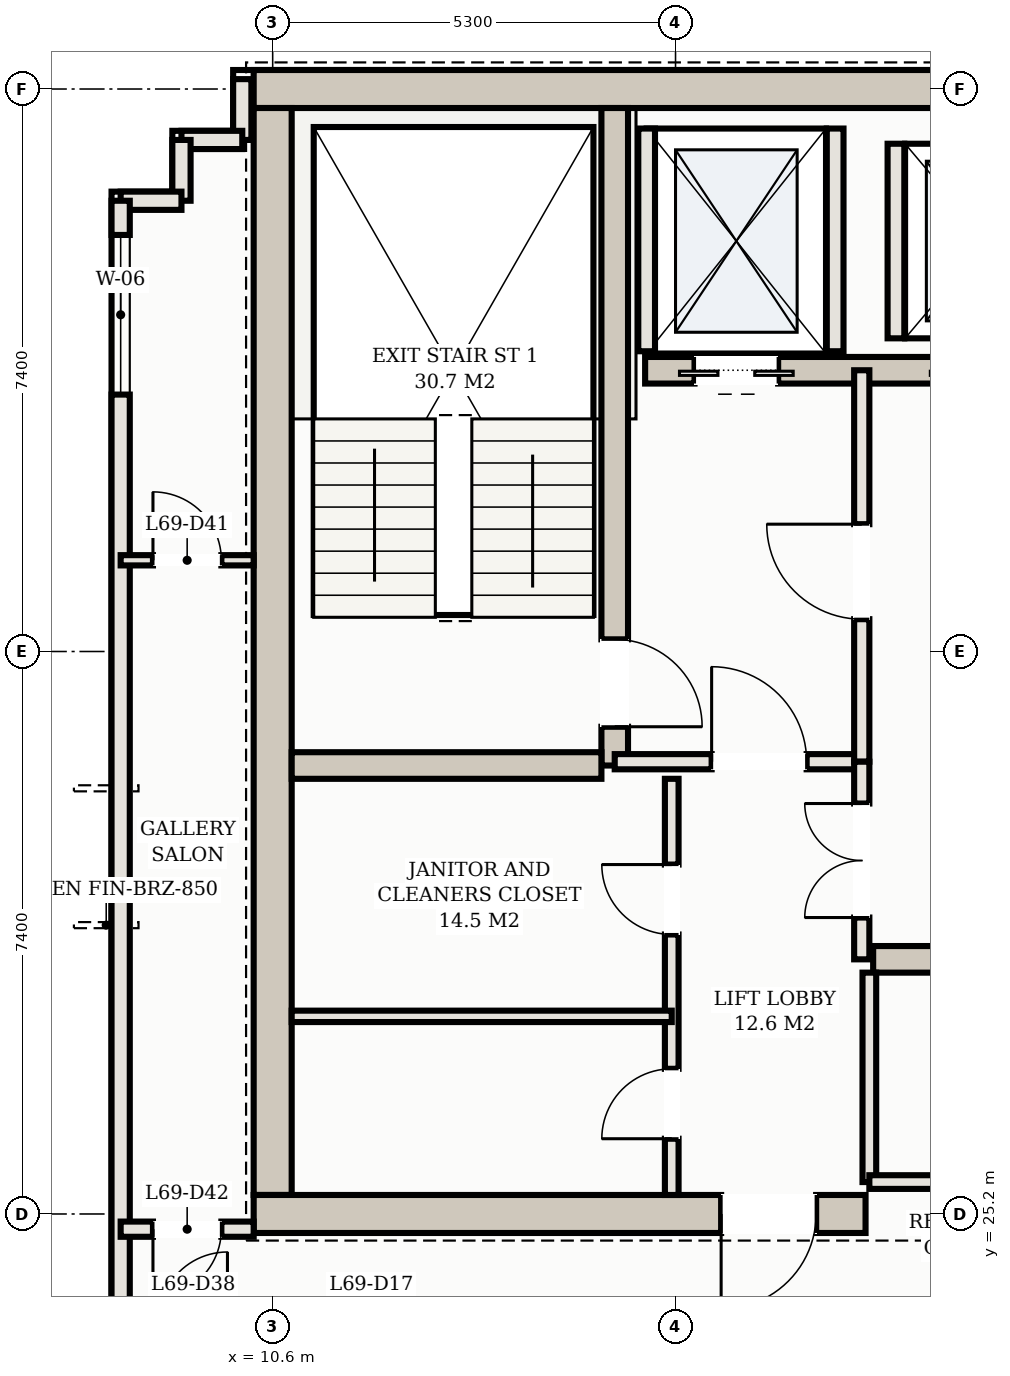
"""IFC4 building model, lengths in metres.
Left out: names, types, materials, properties, quantities, classifications, styles, units other than length and angle.
Written with IfcOpenShell. Run it as: python <this file> out.ifc"""

import sys

from ifc_helpers import new_model, si_unit, direction, frame, frame_2d, origin, place, context, subcontext, project, spatial, rectangle, extrude, element, fill, save


model = new_model("IFC4")
c1 = context("Model", 3, precision=1e-05, world=origin(), true_north=direction((0.0, 1.0)))
c2 = subcontext(c1, "Body", "Model", "MODEL_VIEW")
j1 = project(units=[si_unit("LENGTHUNIT", "METRE"), si_unit("PLANEANGLEUNIT", "RADIAN")], contexts=[c1])
p1 = place(None, origin())
s1 = spatial("IfcSite", under=j1, at=p1, CompositionType="ELEMENT")
p2 = place(p1, origin())
s2 = spatial("IfcBuilding", under=s1, at=p2, CompositionType="ELEMENT")
p3 = place(p2, frame((0.0, 0.0, 249.5)))
s3 = spatial("IfcBuildingStorey", under=s2, at=p3, CompositionType="ELEMENT", Elevation=249.5)
p4 = place(p3, frame((10.35, 40.0, 0.0), z_axis=(0.0, 0.0, 1.0), x_axis=(1.0, 0.0, 0.0)))
e1 = element("IfcWall", 1, at=p4, inside=s3, PredefinedType="SHEAR", context=c2, shape_type="SweptSolid", body=[
    extrude(rectangle(XDim=32.3, YDim=0.5, at=frame_2d((16.15, 0.0))), origin(), (0.0, 0.0, 1.0), 3.11),
])
p5 = place(p3, frame((10.6, 25.45, 0.0), z_axis=(0.0, 0.0, 1.0), x_axis=(0.0, 1.0, 0.0)))
e2 = element("IfcWall", 2, at=p5, inside=s3, PredefinedType="SHEAR", context=c2, shape_type="SweptSolid", body=[
    extrude(rectangle(XDim=14.3, YDim=0.5, at=frame_2d((7.15, 0.0))), origin(), (0.0, 0.0, 1.0), 3.11),
])
p6 = place(p3, frame((10.35, 25.2, 0.0), z_axis=(0.0, 0.0, 1.0), x_axis=(1.0, 0.0, 0.0)))
e3 = element("IfcWall", 3, at=p6, inside=s3, PredefinedType="SHEAR", context=c2, shape_type="SweptSolid", body=[
    extrude(rectangle(XDim=8.05, YDim=0.5, at=frame_2d((4.025, 0.0))), origin(), (0.0, 0.0, 1.0), 3.11),
])
p7 = place(p6, frame((6.15, 0.0, 0.0)))
e4 = element("IfcOpeningElement", 4, at=p7, cuts=e3, PredefinedType="OPENING", context=c2, shape_type="SweptSolid", body=[
    extrude(rectangle(XDim=1.25, YDim=2.2, at=frame_2d((0.625, 1.1))), frame((0.0, 0.26, 0.0), z_axis=(0.0, -1.0, 0.0), x_axis=(1.0, 0.0, 0.0)), (0.0, 0.0, 1.0), 0.52),
])
p8 = place(p3, frame((15.1, 31.1, 0.0), z_axis=(0.0, 0.0, 1.0), x_axis=(0.0, 1.0, 0.0)))
e5 = element("IfcWall", 5, at=p8, inside=s3, PredefinedType="SHEAR", context=c2, shape_type="SweptSolid", body=[
    extrude(rectangle(XDim=8.65, YDim=0.35, at=frame_2d((4.325, 0.0))), origin(), (0.0, 0.0, 1.0), 3.11),
])
p9 = place(p8, frame((0.51, 0.0, 0.0)))
e6 = element("IfcOpeningElement", 6, at=p9, cuts=e5, PredefinedType="OPENING", context=c2, shape_type="SweptSolid", body=[
    extrude(rectangle(XDim=1.15, YDim=2.2, at=frame_2d((0.575, 1.1))), frame((0.0, 0.185, 0.0), z_axis=(0.0, -1.0, 0.0), x_axis=(1.0, 0.0, 0.0)), (0.0, 0.0, 1.0), 0.37),
])
p10 = place(p3, frame((10.85, 31.1, 0.0), z_axis=(0.0, 0.0, 1.0), x_axis=(1.0, 0.0, 0.0)))
e7 = element("IfcWall", 7, at=p10, inside=s3, PredefinedType="SHEAR", context=c2, shape_type="SweptSolid", body=[
    extrude(rectangle(XDim=4.075, YDim=0.35, at=frame_2d((2.038, 0.0))), origin(), (0.0, 0.0, 1.0), 3.11),
])
p11 = place(p3, frame((15.5, 36.3, 0.0), z_axis=(0.0, 0.0, 1.0), x_axis=(1.0, 0.0, 0.0)))
e8 = element("IfcWall", 8, at=p11, inside=s3, PredefinedType="SHEAR", context=c2, shape_type="SweptSolid", body=[
    extrude(rectangle(XDim=22.0, YDim=0.35, at=frame_2d((11.0, 0.0))), origin(), (0.0, 0.0, 1.0), 3.11),
])
p12 = place(p11, frame((0.65, 0.0, 0.0)))
e9 = element("IfcOpeningElement", 9, at=p12, cuts=e8, PredefinedType="OPENING", context=c2, shape_type="SweptSolid", body=[
    extrude(rectangle(XDim=1.1, YDim=2.15, at=frame_2d((0.55, 1.075))), frame((0.0, 0.185, 0.0), z_axis=(0.0, -1.0, 0.0), x_axis=(1.0, 0.0, 0.0)), (0.0, 0.0, 1.0), 0.37),
])
p13 = place(p11, frame((20.25, 0.0, 0.0)))
e10 = element("IfcOpeningElement", 10, at=p13, cuts=e8, PredefinedType="OPENING", context=c2, shape_type="SweptSolid", body=[
    extrude(rectangle(XDim=1.1, YDim=2.15, at=frame_2d((0.55, 1.075))), frame((0.0, 0.185, 0.0), z_axis=(0.0, -1.0, 0.0), x_axis=(1.0, 0.0, 0.0)), (0.0, 0.0, 1.0), 0.37),
])
p14 = place(p11, frame((17.05, 0.0, 0.0)))
e11 = element("IfcOpeningElement", 11, at=p14, cuts=e8, PredefinedType="OPENING", context=c2, shape_type="SweptSolid", body=[
    extrude(rectangle(XDim=1.3, YDim=2.2, at=frame_2d((0.65, 1.1))), frame((0.0, 0.185, 0.0), z_axis=(0.0, -1.0, 0.0), x_axis=(1.0, 0.0, 0.0)), (0.0, 0.0, 1.0), 0.37),
])
p15 = place(p11, frame((3.95, 0.0, 0.0)))
e12 = element("IfcOpeningElement", 12, at=p15, cuts=e8, PredefinedType="OPENING", context=c2, shape_type="SweptSolid", body=[
    extrude(rectangle(XDim=1.1, YDim=2.15, at=frame_2d((0.55, 1.075))), frame((0.0, 0.185, 0.0), z_axis=(0.0, -1.0, 0.0), x_axis=(1.0, 0.0, 0.0)), (0.0, 0.0, 1.0), 0.37),
])
p16 = place(p11, frame((6.55, 0.0, 0.0)))
e13 = element("IfcOpeningElement", 13, at=p16, cuts=e8, PredefinedType="OPENING", context=c2, shape_type="SweptSolid", body=[
    extrude(rectangle(XDim=1.1, YDim=2.15, at=frame_2d((0.55, 1.075))), frame((0.0, 0.185, 0.0), z_axis=(0.0, -1.0, 0.0), x_axis=(1.0, 0.0, 0.0)), (0.0, 0.0, 1.0), 0.37),
])
p17 = place(p11, frame((9.15, 0.0, 0.0)))
e14 = element("IfcOpeningElement", 14, at=p17, cuts=e8, PredefinedType="OPENING", context=c2, shape_type="SweptSolid", body=[
    extrude(rectangle(XDim=1.1, YDim=2.15, at=frame_2d((0.55, 1.075))), frame((0.0, 0.185, 0.0), z_axis=(0.0, -1.0, 0.0), x_axis=(1.0, 0.0, 0.0)), (0.0, 0.0, 1.0), 0.37),
])
p18 = place(p3, frame((18.5, 28.55, 0.0), z_axis=(0.0, 0.0, 1.0), x_axis=(1.0, 0.0, 0.0)))
e15 = element("IfcWall", 15, at=p18, inside=s3, PredefinedType="SHEAR", context=c2, shape_type="SweptSolid", body=[
    extrude(rectangle(XDim=16.0, YDim=0.35, at=frame_2d((8.0, 0.0))), origin(), (0.0, 0.0, 1.0), 3.11),
])
for number, where, z_axis, x_axis in (
    (16, (15.52, 36.55, 0.0), (0.0, 0.0, 1.0), (0.0, 1.0, 0.0)),
    (17, (18.0, 36.55, 0.0), (0.0, 0.0, 1.0), (0.0, 1.0, 0.0)),
):
    element("IfcWall", number, at=place(p3, frame(where, z_axis=z_axis, x_axis=x_axis)), inside=s3, PredefinedType="SOLIDWALL", context=c2, shape_type="SweptSolid", body=[
        extrude(rectangle(XDim=2.93, YDim=0.22, at=frame_2d((1.465, 0.0))), origin(), (0.0, 0.0, 1.0), 3.11),
    ])
p19 = place(p3, frame((18.8, 36.72, 0.0), z_axis=(0.0, 0.0, 1.0), x_axis=(0.0, 1.0, 0.0)))
e18 = element("IfcWall", 18, at=p19, inside=s3, PredefinedType="SOLIDWALL", context=c2, shape_type="SweptSolid", body=[
    extrude(rectangle(XDim=2.56, YDim=0.22, at=frame_2d((1.28, 0.0))), origin(), (0.0, 0.0, 1.0), 3.11),
])
p20 = place(p3, frame((10.2, 40.13, 0.0), z_axis=(0.0, 0.0, 1.0), x_axis=(0.0, -1.0, 0.0)))
e19 = element("IfcWall", 19, at=p20, inside=s3, PredefinedType="SOLIDWALL", context=c2, shape_type="SweptSolid", body=[
    extrude(rectangle(XDim=0.8, YDim=0.24, at=frame_2d((0.4, 0.0))), origin(), (0.0, 0.0, 1.0), 3.11),
])
for number, where, z_axis, x_axis in (
    (20, (10.2, 39.33, 0.0), (0.0, 0.0, 1.0), (-1.0, 0.0, 0.0)),
    (21, (9.4, 39.33, 0.0), (0.0, 0.0, 1.0), (0.0, -1.0, 0.0)),
):
    element("IfcWall", number, at=place(p3, frame(where, z_axis=z_axis, x_axis=x_axis)), inside=s3, PredefinedType="SOLIDWALL", context=c2, shape_type="SweptSolid", body=[
        extrude(rectangle(XDim=0.8, YDim=0.24, at=frame_2d((0.4, 0.0))), origin(), (0.0, 0.0, 1.0), 3.11),
    ])
p21 = place(p3, frame((9.4, 38.53, 0.0), z_axis=(0.0, 0.0, 1.0), x_axis=(-1.0, 0.0, 0.0)))
e22 = element("IfcWall", 22, at=p21, inside=s3, PredefinedType="SOLIDWALL", context=c2, shape_type="SweptSolid", body=[
    extrude(rectangle(XDim=0.8, YDim=0.24, at=frame_2d((0.4, 0.0))), origin(), (0.0, 0.0, 1.0), 3.11),
])
p22 = place(p3, frame((8.6, 38.53, 0.0), z_axis=(0.0, 0.0, 1.0), x_axis=(0.0, -1.0, 0.0)))
e23 = element("IfcWall", 23, at=p22, inside=s3, PredefinedType="SOLIDWALL", context=c2, shape_type="SweptSolid", body=[
    extrude(rectangle(XDim=26.01, YDim=0.24, at=frame_2d((13.005, 0.0))), origin(), (0.0, 0.0, 1.0), 3.11),
])
p23 = place(p22, frame((19.73, 0.0, 0.0)))
e24 = element("IfcOpeningElement", 24, at=p23, cuts=e23, PredefinedType="OPENING", context=c2, shape_type="SweptSolid", body=[
    extrude(rectangle(XDim=1.8, YDim=2.2, at=frame_2d((0.9, 1.1))), frame((0.0, 0.13, 0.0), z_axis=(0.0, -1.0, 0.0), x_axis=(1.0, 0.0, 0.0)), (0.0, 0.0, 1.0), 0.26),
])
p24 = place(p22, frame((0.45, 0.0, 0.75)))
e25 = element("IfcOpeningElement", 25, at=p24, cuts=e23, PredefinedType="OPENING", context=c2, shape_type="SweptSolid", body=[
    extrude(rectangle(XDim=2.1, YDim=1.65, at=frame_2d((1.05, 0.825))), frame((0.0, 0.13, 0.0), z_axis=(0.0, -1.0, 0.0), x_axis=(1.0, 0.0, 0.0)), (0.0, 0.0, 1.0), 0.26),
])
p25 = place(p3, frame((15.1, 31.15, 0.0), z_axis=(0.0, 0.0, 1.0), x_axis=(1.0, 0.0, 0.0)))
e26 = element("IfcWall", 26, at=p25, inside=s3, PredefinedType="PARTITIONING", context=c2, shape_type="SweptSolid", body=[
    extrude(rectangle(XDim=3.25, YDim=0.2, at=frame_2d((1.625, 0.0))), origin(), (0.0, 0.0, 1.0), 2.45),
])
p26 = place(p25, frame((1.275, 0.0, 0.0)))
e27 = element("IfcOpeningElement", 27, at=p26, cuts=e26, PredefinedType="OPENING", context=c2, shape_type="SweptSolid", body=[
    extrude(rectangle(XDim=1.25, YDim=2.2, at=frame_2d((0.625, 1.1))), frame((0.0, 0.11, 0.0), z_axis=(0.0, -1.0, 0.0), x_axis=(1.0, 0.0, 0.0)), (0.0, 0.0, 1.0), 0.22),
])
p27 = place(p3, frame((18.35, 31.15, 0.0), z_axis=(0.0, 0.0, 1.0), x_axis=(0.0, 1.0, 0.0)))
e28 = element("IfcWall", 28, at=p27, inside=s3, PredefinedType="PARTITIONING", context=c2, shape_type="SweptSolid", body=[
    extrude(rectangle(XDim=5.15, YDim=0.2, at=frame_2d((2.575, 0.0))), origin(), (0.0, 0.0, 1.0), 2.45),
])
p28 = place(p27, frame((1.875, 0.0, 0.0)))
e29 = element("IfcOpeningElement", 29, at=p28, cuts=e28, PredefinedType="OPENING", context=c2, shape_type="SweptSolid", body=[
    extrude(rectangle(XDim=1.25, YDim=2.2, at=frame_2d((0.625, 1.1))), frame((0.0, 0.11, 0.0), z_axis=(0.0, -1.0, 0.0), x_axis=(1.0, 0.0, 0.0)), (0.0, 0.0, 1.0), 0.22),
])
p29 = place(p3, frame((15.85, 25.45, 0.0), z_axis=(0.0, 0.0, 1.0), x_axis=(0.0, 1.0, 0.0)))
e30 = element("IfcWall", 30, at=p29, inside=s3, PredefinedType="PARTITIONING", context=c2, shape_type="SweptSolid", body=[
    extrude(rectangle(XDim=5.475, YDim=0.18, at=frame_2d((2.738, 0.0))), origin(), (0.0, 0.0, 1.0), 2.45),
])
p30 = place(p29, frame((0.74, 0.0, 0.0)))
e31 = element("IfcOpeningElement", 31, at=p30, cuts=e30, PredefinedType="OPENING", context=c2, shape_type="SweptSolid", body=[
    extrude(rectangle(XDim=0.92, YDim=2.15, at=frame_2d((0.46, 1.075))), frame((0.0, 0.1, 0.0), z_axis=(0.0, -1.0, 0.0), x_axis=(1.0, 0.0, 0.0)), (0.0, 0.0, 1.0), 0.2),
])
p31 = place(p29, frame((3.427, 0.0, 0.0)))
e32 = element("IfcOpeningElement", 32, at=p31, cuts=e30, PredefinedType="OPENING", context=c2, shape_type="SweptSolid", body=[
    extrude(rectangle(XDim=0.92, YDim=2.15, at=frame_2d((0.46, 1.075))), frame((0.0, 0.1, 0.0), z_axis=(0.0, -1.0, 0.0), x_axis=(1.0, 0.0, 0.0)), (0.0, 0.0, 1.0), 0.2),
])
p32 = place(p3, frame((10.85, 27.8, 0.0), z_axis=(0.0, 0.0, 1.0), x_axis=(1.0, 0.0, 0.0)))
e33 = element("IfcWall", 33, at=p32, inside=s3, PredefinedType="PARTITIONING", context=c2, shape_type="SweptSolid", body=[
    extrude(rectangle(XDim=5.0, YDim=0.15, at=frame_2d((2.5, 0.0))), origin(), (0.0, 0.0, 1.0), 2.45),
])
p33 = place(p3, frame((18.35, 28.55, 0.0), z_axis=(0.0, 0.0, 1.0), x_axis=(0.0, 1.0, 0.0)))
e34 = element("IfcWall", 34, at=p33, inside=s3, PredefinedType="PARTITIONING", context=c2, shape_type="SweptSolid", body=[
    extrude(rectangle(XDim=2.6, YDim=0.2, at=frame_2d((1.3, 0.0))), origin(), (0.0, 0.0, 1.0), 2.45),
])
p34 = place(p33, frame((0.55, 0.0, 0.0)))
e35 = element("IfcOpeningElement", 35, at=p34, cuts=e34, PredefinedType="OPENING", context=c2, shape_type="SweptSolid", body=[
    extrude(rectangle(XDim=1.5, YDim=2.25, at=frame_2d((0.75, 1.125))), frame((0.0, 0.11, 0.0), z_axis=(0.0, -1.0, 0.0), x_axis=(1.0, 0.0, 0.0)), (0.0, 0.0, 1.0), 0.22),
])
p35 = place(p3, frame((18.45, 25.62, 0.0), z_axis=(0.0, 0.0, 1.0), x_axis=(0.0, 1.0, 0.0)))
e36 = element("IfcWall", 36, at=p35, inside=s3, PredefinedType="PARTITIONING", context=c2, shape_type="SweptSolid", body=[
    extrude(rectangle(XDim=2.755, YDim=0.18, at=frame_2d((1.377, 0.0))), origin(), (0.0, 0.0, 1.0), 2.45),
])
p36 = place(p3, frame((18.45, 25.62, 0.0), z_axis=(0.0, 0.0, 1.0), x_axis=(1.0, 0.0, 0.0)))
e37 = element("IfcWall", 37, at=p36, inside=s3, PredefinedType="PARTITIONING", context=c2, shape_type="SweptSolid", body=[
    extrude(rectangle(XDim=7.9, YDim=0.18, at=frame_2d((3.95, 0.0))), origin(), (0.0, 0.0, 1.0), 2.45),
])
p37 = place(p36, frame((3.34, 0.0, 0.0)))
e38 = element("IfcOpeningElement", 38, at=p37, cuts=e37, PredefinedType="OPENING", context=c2, shape_type="SweptSolid", body=[
    extrude(rectangle(XDim=0.92, YDim=2.15, at=frame_2d((0.46, 1.075))), frame((0.0, 0.1, 0.0), z_axis=(0.0, -1.0, 0.0), x_axis=(1.0, 0.0, 0.0)), (0.0, 0.0, 1.0), 0.2),
])
p38 = place(p3, frame((8.6, 25.0, 0.0), z_axis=(0.0, 0.0, 1.0), x_axis=(1.0, 0.0, 0.0)))
e39 = element("IfcWall", 39, at=p38, inside=s3, PredefinedType="PARTITIONING", context=c2, shape_type="SweptSolid", body=[
    extrude(rectangle(XDim=1.75, YDim=0.2, at=frame_2d((0.875, 0.0))), origin(), (0.0, 0.0, 1.0), 2.45),
])
p39 = place(p38, frame((0.425, 0.0, 0.0)))
e40 = element("IfcOpeningElement", 40, at=p39, cuts=e39, PredefinedType="OPENING", context=c2, shape_type="SweptSolid", body=[
    extrude(rectangle(XDim=0.9, YDim=2.15, at=frame_2d((0.45, 1.075))), frame((0.0, 0.11, 0.0), z_axis=(0.0, -1.0, 0.0), x_axis=(1.0, 0.0, 0.0)), (0.0, 0.0, 1.0), 0.22),
])
p40 = place(p3, frame((8.6, 33.8, 0.0), z_axis=(0.0, 0.0, 1.0), x_axis=(1.0, 0.0, 0.0)))
e41 = element("IfcWall", 41, at=p40, inside=s3, PredefinedType="PARTITIONING", context=c2, shape_type="SweptSolid", body=[
    extrude(rectangle(XDim=1.75, YDim=0.135, at=frame_2d((0.875, 0.0))), origin(), (0.0, 0.0, 1.0), 2.45),
])
p41 = place(p40, frame((0.425, 0.0, 0.0)))
e42 = element("IfcOpeningElement", 42, at=p41, cuts=e41, PredefinedType="OPENING", context=c2, shape_type="SweptSolid", body=[
    extrude(rectangle(XDim=0.9, YDim=2.15, at=frame_2d((0.45, 1.075))), frame((0.0, 0.078, 0.0), z_axis=(0.0, -1.0, 0.0), x_axis=(1.0, 0.0, 0.0)), (0.0, 0.0, 1.0), 0.155),
])
p42 = place(p12, frame((1.1, 0.0, 0.0), z_axis=(0.0, 0.0, 1.0), x_axis=(-1.0, 0.0, 0.0)))
e43 = element("IfcDoor", 43, at=p42, inside=s3, OperationType="DOUBLE_DOOR_SLIDING", PredefinedType="DOOR", context=c2, shape_type="SweptSolid", body=[
    extrude(rectangle(XDim=1.1, YDim=2.15, at=frame_2d((0.55, 1.075))), frame((0.0, 0.025, 0.0), z_axis=(0.0, -1.0, 0.0), x_axis=(1.0, 0.0, 0.0)), (0.0, 0.0, 1.0), 0.05),
])
fill(e9, e43)
p43 = place(p24, origin())
e44 = element("IfcWindow", 44, at=p43, inside=s3, PartitioningType="SINGLE_PANEL", PredefinedType="WINDOW", context=c2, shape_type="SweptSolid", body=[
    extrude(rectangle(XDim=2.1, YDim=1.65, at=frame_2d((1.05, 0.825))), frame((0.0, 0.03, 0.0), z_axis=(0.0, -1.0, 0.0), x_axis=(1.0, 0.0, 0.0)), (0.0, 0.0, 1.0), 0.06),
])
fill(e25, e44)
p44 = place(p7, frame((1.25, 0.0, 0.0), z_axis=(0.0, 0.0, 1.0), x_axis=(-1.0, 0.0, 0.0)))
e45 = element("IfcDoor", 45, at=p44, inside=s3, OperationType="SINGLE_SWING_RIGHT", PredefinedType="DOOR", context=c2, shape_type="SweptSolid", body=[
    extrude(rectangle(XDim=1.25, YDim=2.2, at=frame_2d((0.625, 1.1))), frame((0.0, 0.025, 0.0), z_axis=(0.0, -1.0, 0.0), x_axis=(1.0, 0.0, 0.0)), (0.0, 0.0, 1.0), 0.05),
])
fill(e4, e45)
p45 = place(p26, origin())
e46 = element("IfcDoor", 46, at=p45, inside=s3, OperationType="SINGLE_SWING_LEFT", PredefinedType="DOOR", context=c2, shape_type="SweptSolid", body=[
    extrude(rectangle(XDim=1.25, YDim=2.2, at=frame_2d((0.625, 1.1))), frame((0.0, 0.025, 0.0), z_axis=(0.0, -1.0, 0.0), x_axis=(1.0, 0.0, 0.0)), (0.0, 0.0, 1.0), 0.05),
])
fill(e27, e46)
p46 = place(p28, origin())
e47 = element("IfcDoor", 47, at=p46, inside=s3, OperationType="SINGLE_SWING_RIGHT", PredefinedType="DOOR", context=c2, shape_type="SweptSolid", body=[
    extrude(rectangle(XDim=1.25, YDim=2.2, at=frame_2d((0.625, 1.1))), frame((0.0, 0.025, 0.0), z_axis=(0.0, -1.0, 0.0), x_axis=(1.0, 0.0, 0.0)), (0.0, 0.0, 1.0), 0.05),
])
fill(e29, e47)
p47 = place(p9, frame((1.15, 0.0, 0.0), z_axis=(0.0, 0.0, 1.0), x_axis=(-1.0, 0.0, 0.0)))
e48 = element("IfcDoor", 48, at=p47, inside=s3, OperationType="SINGLE_SWING_RIGHT", PredefinedType="DOOR", context=c2, shape_type="SweptSolid", body=[
    extrude(rectangle(XDim=1.15, YDim=2.2, at=frame_2d((0.575, 1.1))), frame((0.0, 0.025, 0.0), z_axis=(0.0, -1.0, 0.0), x_axis=(1.0, 0.0, 0.0)), (0.0, 0.0, 1.0), 0.05),
])
fill(e6, e48)
p48 = place(p30, origin())
e49 = element("IfcDoor", 49, at=p48, inside=s3, OperationType="SINGLE_SWING_LEFT", PredefinedType="DOOR", context=c2, shape_type="SweptSolid", body=[
    extrude(rectangle(XDim=0.92, YDim=2.15, at=frame_2d((0.46, 1.075))), frame((0.0, 0.025, 0.0), z_axis=(0.0, -1.0, 0.0), x_axis=(1.0, 0.0, 0.0)), (0.0, 0.0, 1.0), 0.05),
])
fill(e31, e49)
p49 = place(p31, origin())
e50 = element("IfcDoor", 50, at=p49, inside=s3, OperationType="SINGLE_SWING_RIGHT", PredefinedType="DOOR", context=c2, shape_type="SweptSolid", body=[
    extrude(rectangle(XDim=0.92, YDim=2.15, at=frame_2d((0.46, 1.075))), frame((0.0, 0.025, 0.0), z_axis=(0.0, -1.0, 0.0), x_axis=(1.0, 0.0, 0.0)), (0.0, 0.0, 1.0), 0.05),
])
fill(e32, e50)
p50 = place(p34, origin())
e51 = element("IfcDoor", 51, at=p50, inside=s3, OperationType="DOUBLE_DOOR_SINGLE_SWING", PredefinedType="DOOR", context=c2, shape_type="SweptSolid", body=[
    extrude(rectangle(XDim=1.5, YDim=2.25, at=frame_2d((0.75, 1.125))), frame((0.0, 0.025, 0.0), z_axis=(0.0, -1.0, 0.0), x_axis=(1.0, 0.0, 0.0)), (0.0, 0.0, 1.0), 0.05),
])
fill(e35, e51)
p51 = place(p41, origin())
e52 = element("IfcDoor", 52, at=p51, inside=s3, OperationType="SINGLE_SWING_LEFT", PredefinedType="DOOR", context=c2, shape_type="SweptSolid", body=[
    extrude(rectangle(XDim=0.9, YDim=2.15, at=frame_2d((0.45, 1.075))), frame((0.0, 0.025, 0.0), z_axis=(0.0, -1.0, 0.0), x_axis=(1.0, 0.0, 0.0)), (0.0, 0.0, 1.0), 0.05),
])
fill(e42, e52)
p52 = place(p39, frame((0.9, 0.0, 0.0), z_axis=(0.0, 0.0, 1.0), x_axis=(-1.0, 0.0, 0.0)))
e53 = element("IfcDoor", 53, at=p52, inside=s3, OperationType="SINGLE_SWING_RIGHT", PredefinedType="DOOR", context=c2, shape_type="SweptSolid", body=[
    extrude(rectangle(XDim=0.9, YDim=2.15, at=frame_2d((0.45, 1.075))), frame((0.0, 0.025, 0.0), z_axis=(0.0, -1.0, 0.0), x_axis=(1.0, 0.0, 0.0)), (0.0, 0.0, 1.0), 0.05),
])
fill(e40, e53)
save(model, sys.argv[1])
